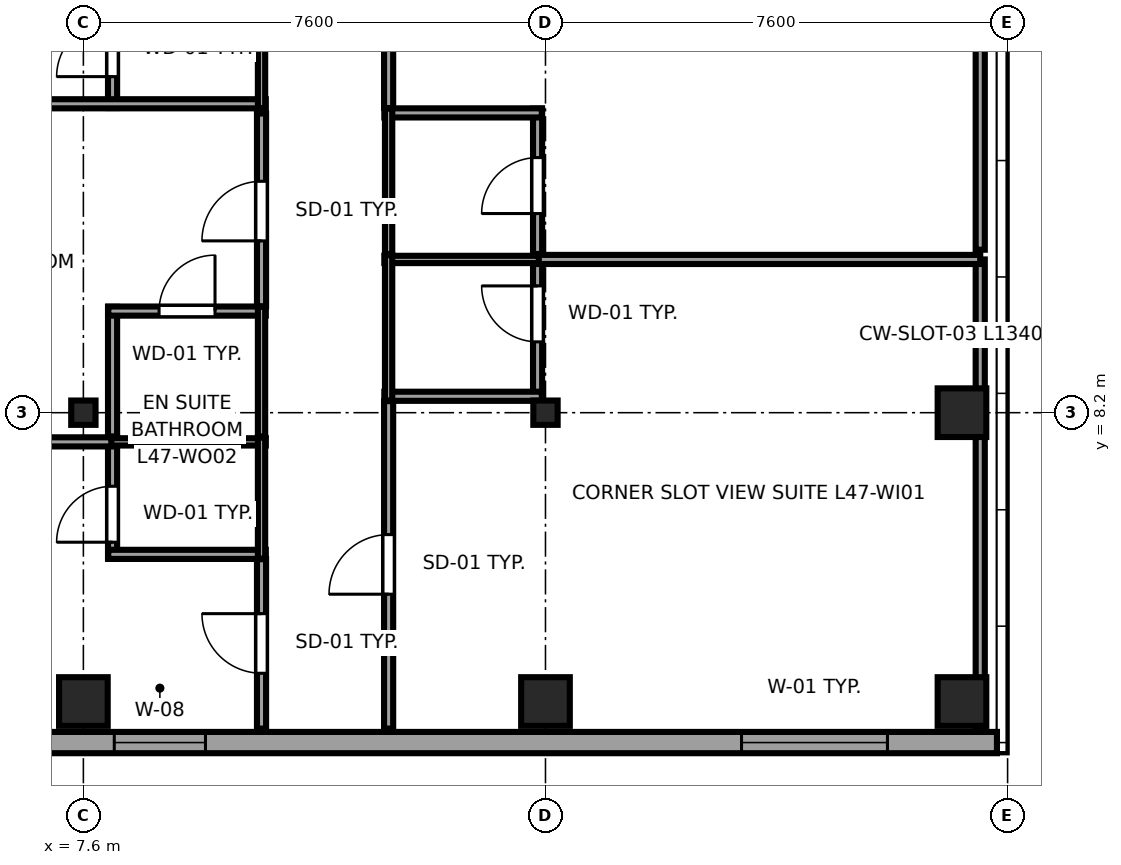
"""IFC4 building model, lengths in metres.
Left out: names, types, materials, properties, quantities, classifications, styles, units other than length and angle.
Written with IfcOpenShell. Run it as: python <this file> out.ifc"""

import sys

from ifc_helpers import new_model, si_unit, direction, frame, frame_2d, origin, origin_2d, place, context, subcontext, project, spatial, rectangle, i_section, extrude, source, transform, mapped, element, fill, save


model = new_model("IFC4")
c1 = context("Model", 3, precision=1e-05, world=origin(), true_north=direction((0.0, 1.0)))
c2 = subcontext(c1, "Body", "Model", "MODEL_VIEW")
j1 = project(units=[si_unit("LENGTHUNIT", "METRE"), si_unit("PLANEANGLEUNIT", "RADIAN")], contexts=[c1])
p1 = place(None, origin())
s1 = spatial("IfcSite", under=j1, at=p1, CompositionType="ELEMENT")
p2 = place(p1, origin())
s2 = spatial("IfcBuilding", under=s1, at=p2, CompositionType="ELEMENT")
p3 = place(p2, frame((0.0, 0.0, 179.0)))
s3 = spatial("IfcBuildingStorey", under=s2, at=p3, CompositionType="ELEMENT", Elevation=179.0)
m1 = source(origin(), c2, "Body", "SweptSolid", [
    extrude(rectangle(XDim=0.8, YDim=0.8, at=origin_2d()), origin(), (0.0, 0.0, 1.0), 3.55),
])
p4 = place(p3, frame((7.6, 3.45, 0.0), z_axis=(0.0, 0.0, 1.0), x_axis=(1.0, 0.0, 0.0)))
e1 = element("IfcColumn", 1, at=p4, inside=s3, PredefinedType="COLUMN", context=c2, shape_type="MappedRepresentation", body=[
    mapped(m1, transform((0.0, 0.0, 0.0), x_axis=(1.0, 0.0, 0.0), y_axis=(0.0, 1.0, 0.0), z_axis=(0.0, 0.0, 1.0), scale=1.0)),
])
m2 = source(origin(), c2, "Body", "SweptSolid", [
    extrude(i_section(OverallWidth=0.4, OverallDepth=0.4, WebThickness=0.02, FlangeThickness=0.035, at=origin_2d()), origin(), (0.0, 0.0, 1.0), 3.55),
])
p5 = place(p3, frame((7.6, 8.2, 0.0), z_axis=(0.0, 0.0, 1.0), x_axis=(1.0, 0.0, 0.0)))
e2 = element("IfcColumn", 2, at=p5, inside=s3, PredefinedType="COLUMN", context=c2, shape_type="MappedRepresentation", body=[
    mapped(m2, transform((0.0, 0.0, 0.0), x_axis=(1.0, 0.0, 0.0), y_axis=(0.0, 1.0, 0.0), z_axis=(0.0, 0.0, 1.0), scale=1.0)),
])
p6 = place(p3, frame((15.2, 3.45, 0.0), z_axis=(0.0, 0.0, 1.0), x_axis=(1.0, 0.0, 0.0)))
e3 = element("IfcColumn", 3, at=p6, inside=s3, PredefinedType="COLUMN", context=c2, shape_type="MappedRepresentation", body=[
    mapped(m1, transform((0.0, 0.0, 0.0), x_axis=(1.0, 0.0, 0.0), y_axis=(0.0, 1.0, 0.0), z_axis=(0.0, 0.0, 1.0), scale=1.0)),
])
p7 = place(p3, frame((15.2, 8.2, 0.0), z_axis=(0.0, 0.0, 1.0), x_axis=(1.0, 0.0, 0.0)))
e4 = element("IfcColumn", 4, at=p7, inside=s3, PredefinedType="COLUMN", context=c2, shape_type="MappedRepresentation", body=[
    mapped(m2, transform((0.0, 0.0, 0.0), x_axis=(1.0, 0.0, 0.0), y_axis=(0.0, 1.0, 0.0), z_axis=(0.0, 0.0, 1.0), scale=1.0)),
])
for number, where, z_axis, x_axis in (
    (5, (22.05, 3.45, 0.0), (0.0, 0.0, 1.0), (1.0, 0.0, 0.0)),
    (6, (22.05, 8.2, 0.0), (0.0, 0.0, 1.0), (1.0, 0.0, 0.0)),
):
    element("IfcColumn", number, at=place(p3, frame(where, z_axis=z_axis, x_axis=x_axis)), inside=s3, PredefinedType="COLUMN", context=c2, shape_type="MappedRepresentation", body=[
        mapped(m1, transform((0.0, 0.0, 0.0), x_axis=(1.0, 0.0, 0.0), y_axis=(0.0, 1.0, 0.0), z_axis=(0.0, 0.0, 1.0), scale=1.0)),
    ])
p8 = place(p3, frame((7.017, 2.775, 0.0), z_axis=(0.0, 0.0, 1.0), x_axis=(1.0, 0.0, 0.0)))
e7 = element("IfcWall", 7, at=p8, inside=s3, PredefinedType="SOLIDWALL", context=c2, shape_type="SweptSolid", body=[
    extrude(rectangle(XDim=15.608, YDim=0.35, at=frame_2d((7.804, 0.0))), origin(), (0.0, 0.0, 1.0), 3.25),
])
p9 = place(p8, frame((11.407, 0.0, 0.68)))
e8 = element("IfcOpeningElement", 8, at=p9, cuts=e7, PredefinedType="OPENING", context=c2, shape_type="SweptSolid", body=[
    extrude(rectangle(XDim=2.4, YDim=1.9, at=frame_2d((1.2, 0.95))), frame((0.0, 0.185, 0.0), z_axis=(0.0, -1.0, 0.0), x_axis=(1.0, 0.0, 0.0)), (0.0, 0.0, 1.0), 0.37),
])
p10 = place(p8, frame((1.091, 0.0, 0.62)))
e9 = element("IfcOpeningElement", 9, at=p10, cuts=e7, PredefinedType="OPENING", context=c2, shape_type="SweptSolid", body=[
    extrude(rectangle(XDim=1.5, YDim=1.55, at=frame_2d((0.75, 0.775))), frame((0.0, 0.185, 0.0), z_axis=(0.0, -1.0, 0.0), x_axis=(1.0, 0.0, 0.0)), (0.0, 0.0, 1.0), 0.37),
])
p11 = place(p3, frame((8.08, 5.8, 0.0), z_axis=(0.0, 0.0, 1.0), x_axis=(0.0, 1.0, 0.0)))
e10 = element("IfcWall", 10, at=p11, inside=s3, PredefinedType="PARTITIONING", context=c2, shape_type="SweptSolid", body=[
    extrude(rectangle(XDim=1.99, YDim=0.15, at=frame_2d((0.995, 0.0))), origin(), (0.0, 0.0, 1.0), 3.25),
])
p12 = place(p11, frame((0.27, 0.0, 0.0)))
e11 = element("IfcOpeningElement", 11, at=p12, cuts=e10, PredefinedType="OPENING", context=c2, shape_type="SweptSolid", body=[
    extrude(rectangle(XDim=0.92, YDim=2.01, at=frame_2d((0.46, 1.005))), frame((0.0, 0.085, 0.0), z_axis=(0.0, -1.0, 0.0), x_axis=(1.0, 0.0, 0.0)), (0.0, 0.0, 1.0), 0.17),
])
p13 = place(p3, frame((8.01, 5.87, 0.0), z_axis=(0.0, 0.0, 1.0), x_axis=(1.0, 0.0, 0.0)))
e12 = element("IfcWall", 12, at=p13, inside=s3, PredefinedType="PARTITIONING", context=c2, shape_type="SweptSolid", body=[
    extrude(rectangle(XDim=2.59, YDim=0.15, at=frame_2d((1.295, 0.0))), origin(), (0.0, 0.0, 1.0), 3.25),
])
p14 = place(p3, frame((8.01, 7.72, 0.0), z_axis=(0.0, 0.0, 1.0), x_axis=(1.0, 0.0, 0.0)))
e13 = element("IfcWall", 13, at=p14, inside=s3, PredefinedType="PLUMBINGWALL", context=c2, shape_type="SweptSolid", body=[
    extrude(rectangle(XDim=2.59, YDim=0.12, at=frame_2d((1.295, 0.0))), origin(), (0.0, 0.0, 1.0), 3.25),
])
p15 = place(p3, frame((10.53, 5.8, 0.0), z_axis=(0.0, 0.0, 1.0), x_axis=(0.0, 1.0, 0.0)))
e14 = element("IfcWall", 14, at=p15, inside=s3, PredefinedType="PLUMBINGWALL", context=c2, shape_type="SweptSolid", body=[
    extrude(rectangle(XDim=1.99, YDim=0.12, at=frame_2d((0.995, 0.0))), origin(), (0.0, 0.0, 1.0), 3.25),
])
p16 = place(p3, frame((8.08, 7.81, 0.0), z_axis=(0.0, 0.0, 1.0), x_axis=(0.0, 1.0, 0.0)))
e15 = element("IfcWall", 15, at=p16, inside=s3, PredefinedType="PARTITIONING", context=c2, shape_type="SweptSolid", body=[
    extrude(rectangle(XDim=2.131, YDim=0.15, at=frame_2d((1.065, 0.0))), origin(), (0.0, 0.0, 1.0), 3.25),
])
p17 = place(p3, frame((8.01, 9.871, 0.0), z_axis=(0.0, 0.0, 1.0), x_axis=(1.0, 0.0, 0.0)))
e16 = element("IfcWall", 16, at=p17, inside=s3, PredefinedType="PARTITIONING", context=c2, shape_type="SweptSolid", body=[
    extrude(rectangle(XDim=2.59, YDim=0.15, at=frame_2d((1.295, 0.0))), origin(), (0.0, 0.0, 1.0), 3.25),
])
p18 = place(p17, frame((0.835, 0.0, 0.0)))
e17 = element("IfcOpeningElement", 17, at=p18, cuts=e16, PredefinedType="OPENING", context=c2, shape_type="SweptSolid", body=[
    extrude(rectangle(XDim=0.92, YDim=2.01, at=frame_2d((0.46, 1.005))), frame((0.0, 0.085, 0.0), z_axis=(0.0, -1.0, 0.0), x_axis=(1.0, 0.0, 0.0)), (0.0, 0.0, 1.0), 0.17),
])
p19 = place(p3, frame((10.53, 7.81, 0.0), z_axis=(0.0, 0.0, 1.0), x_axis=(0.0, 1.0, 0.0)))
e18 = element("IfcWall", 18, at=p19, inside=s3, PredefinedType="PLUMBINGWALL", context=c2, shape_type="SweptSolid", body=[
    extrude(rectangle(XDim=2.131, YDim=0.12, at=frame_2d((1.065, 0.0))), origin(), (0.0, 0.0, 1.0), 3.25),
])
p20 = place(p3, frame((8.08, 13.21, 0.0), z_axis=(0.0, 0.0, 1.0), x_axis=(0.0, 1.0, 0.0)))
e19 = element("IfcWall", 19, at=p20, inside=s3, PredefinedType="PARTITIONING", context=c2, shape_type="SweptSolid", body=[
    extrude(rectangle(XDim=2.093, YDim=0.15, at=frame_2d((1.046, 0.0))), origin(), (0.0, 0.0, 1.0), 3.25),
])
p21 = place(p20, frame((0.517, 0.0, 0.0)))
e20 = element("IfcOpeningElement", 20, at=p21, cuts=e19, PredefinedType="OPENING", context=c2, shape_type="SweptSolid", body=[
    extrude(rectangle(XDim=0.92, YDim=2.01, at=frame_2d((0.46, 1.005))), frame((0.0, 0.085, 0.0), z_axis=(0.0, -1.0, 0.0), x_axis=(1.0, 0.0, 0.0)), (0.0, 0.0, 1.0), 0.17),
])
p22 = place(p3, frame((3.005, 13.28, 0.0), z_axis=(0.0, 0.0, 1.0), x_axis=(1.0, 0.0, 0.0)))
e21 = element("IfcWall", 21, at=p22, inside=s3, PredefinedType="PARTITIONING", context=c2, shape_type="SweptSolid", body=[
    extrude(rectangle(XDim=7.595, YDim=0.15, at=frame_2d((3.798, 0.0))), origin(), (0.0, 0.0, 1.0), 3.25),
])
p23 = place(p3, frame((10.53, 13.21, 0.0), z_axis=(0.0, 0.0, 1.0), x_axis=(0.0, 1.0, 0.0)))
e22 = element("IfcWall", 22, at=p23, inside=s3, PredefinedType="PLUMBINGWALL", context=c2, shape_type="SweptSolid", body=[
    extrude(rectangle(XDim=2.093, YDim=0.12, at=frame_2d((1.046, 0.0))), origin(), (0.0, 0.0, 1.0), 3.25),
])
p24 = place(p3, frame((15.07, 8.4, 0.0), z_axis=(0.0, 0.0, 1.0), x_axis=(0.0, 1.0, 0.0)))
e23 = element("IfcWall", 23, at=p24, inside=s3, PredefinedType="PARTITIONING", context=c2, shape_type="SweptSolid", body=[
    extrude(rectangle(XDim=2.39, YDim=0.15, at=frame_2d((1.195, 0.0))), origin(), (0.0, 0.0, 1.0), 2.707),
])
p25 = place(p24, frame((0.965, 0.0, 0.0)))
e24 = element("IfcOpeningElement", 24, at=p25, cuts=e23, PredefinedType="OPENING", context=c2, shape_type="SweptSolid", body=[
    extrude(rectangle(XDim=0.92, YDim=2.01, at=frame_2d((0.46, 1.005))), frame((0.0, 0.085, 0.0), z_axis=(0.0, -1.0, 0.0), x_axis=(1.0, 0.0, 0.0)), (0.0, 0.0, 1.0), 0.17),
])
p26 = place(p3, frame((12.55, 8.47, 0.0), z_axis=(0.0, 0.0, 1.0), x_axis=(1.0, 0.0, 0.0)))
e25 = element("IfcWall", 25, at=p26, inside=s3, PredefinedType="PARTITIONING", context=c2, shape_type="SweptSolid", body=[
    extrude(rectangle(XDim=2.59, YDim=0.15, at=frame_2d((1.295, 0.0))), origin(), (0.0, 0.0, 1.0), 3.25),
])
p27 = place(p3, frame((12.55, 10.72, 0.0), z_axis=(0.0, 0.0, 1.0), x_axis=(1.0, 0.0, 0.0)))
e26 = element("IfcWall", 26, at=p27, inside=s3, PredefinedType="PLUMBINGWALL", context=c2, shape_type="SweptSolid", body=[
    extrude(rectangle(XDim=2.59, YDim=0.12, at=frame_2d((1.295, 0.0))), origin(), (0.0, 0.0, 1.0), 3.25),
])
p28 = place(p3, frame((12.62, 8.4, 0.0), z_axis=(0.0, 0.0, 1.0), x_axis=(0.0, 1.0, 0.0)))
e27 = element("IfcWall", 27, at=p28, inside=s3, PredefinedType="PLUMBINGWALL", context=c2, shape_type="SweptSolid", body=[
    extrude(rectangle(XDim=2.39, YDim=0.12, at=frame_2d((1.195, 0.0))), origin(), (0.0, 0.0, 1.0), 3.25),
])
p29 = place(p3, frame((15.07, 10.81, 0.0), z_axis=(0.0, 0.0, 1.0), x_axis=(0.0, 1.0, 0.0)))
e28 = element("IfcWall", 28, at=p29, inside=s3, PredefinedType="PARTITIONING", context=c2, shape_type="SweptSolid", body=[
    extrude(rectangle(XDim=2.39, YDim=0.15, at=frame_2d((1.195, 0.0))), origin(), (0.0, 0.0, 1.0), 2.707),
])
p30 = place(p29, frame((0.665, 0.0, 0.0)))
e29 = element("IfcOpeningElement", 29, at=p30, cuts=e28, PredefinedType="OPENING", context=c2, shape_type="SweptSolid", body=[
    extrude(rectangle(XDim=0.92, YDim=2.01, at=frame_2d((0.46, 1.005))), frame((0.0, 0.085, 0.0), z_axis=(0.0, -1.0, 0.0), x_axis=(1.0, 0.0, 0.0)), (0.0, 0.0, 1.0), 0.17),
])
p31 = place(p3, frame((12.55, 13.13, 0.0), z_axis=(0.0, 0.0, 1.0), x_axis=(1.0, 0.0, 0.0)))
e30 = element("IfcWall", 30, at=p31, inside=s3, PredefinedType="PARTITIONING", context=c2, shape_type="SweptSolid", body=[
    extrude(rectangle(XDim=2.59, YDim=0.15, at=frame_2d((1.295, 0.0))), origin(), (0.0, 0.0, 1.0), 3.25),
])
p32 = place(p3, frame((12.62, 10.81, 0.0), z_axis=(0.0, 0.0, 1.0), x_axis=(0.0, 1.0, 0.0)))
e31 = element("IfcWall", 31, at=p32, inside=s3, PredefinedType="PLUMBINGWALL", context=c2, shape_type="SweptSolid", body=[
    extrude(rectangle(XDim=2.39, YDim=0.12, at=frame_2d((1.195, 0.0))), origin(), (0.0, 0.0, 1.0), 3.25),
])
p33 = place(p3, frame((10.53, 3.005, 0.0), z_axis=(0.0, 0.0, 1.0), x_axis=(0.0, 1.0, 0.0)))
e32 = element("IfcWall", 32, at=p33, inside=s3, PredefinedType="PARTITIONING", context=c2, shape_type="SweptSolid", body=[
    extrude(rectangle(XDim=2.785, YDim=0.15, at=frame_2d((1.393, 0.0))), origin(), (0.0, 0.0, 1.0), 3.25),
])
p34 = place(p33, frame((0.91, 0.0, 0.0)))
e33 = element("IfcOpeningElement", 33, at=p34, cuts=e32, PredefinedType="OPENING", context=c2, shape_type="SweptSolid", body=[
    extrude(rectangle(XDim=0.98, YDim=2.12, at=frame_2d((0.49, 1.06))), frame((0.0, 0.085, 0.0), z_axis=(0.0, -1.0, 0.0), x_axis=(1.0, 0.0, 0.0)), (0.0, 0.0, 1.0), 0.17),
])
p35 = place(p3, frame((3.005, 7.72, 0.0), z_axis=(0.0, 0.0, 1.0), x_axis=(1.0, 0.0, 0.0)))
e34 = element("IfcWall", 34, at=p35, inside=s3, PredefinedType="PARTITIONING", context=c2, shape_type="SweptSolid", body=[
    extrude(rectangle(XDim=5.055, YDim=0.15, at=frame_2d((2.528, 0.0))), origin(), (0.0, 0.0, 1.0), 3.25),
])
p36 = place(p3, frame((10.53, 9.951, 0.0), z_axis=(0.0, 0.0, 1.0), x_axis=(0.0, 1.0, 0.0)))
e35 = element("IfcWall", 35, at=p36, inside=s3, PredefinedType="PARTITIONING", context=c2, shape_type="SweptSolid", body=[
    extrude(rectangle(XDim=3.169, YDim=0.15, at=frame_2d((1.584, 0.0))), origin(), (0.0, 0.0, 1.0), 3.25),
])
p37 = place(p36, frame((1.074, 0.0, 0.0)))
e36 = element("IfcOpeningElement", 36, at=p37, cuts=e35, PredefinedType="OPENING", context=c2, shape_type="SweptSolid", body=[
    extrude(rectangle(XDim=0.98, YDim=2.12, at=frame_2d((0.49, 1.06))), frame((0.0, 0.085, 0.0), z_axis=(0.0, -1.0, 0.0), x_axis=(1.0, 0.0, 0.0)), (0.0, 0.0, 1.0), 0.17),
])
p38 = place(p3, frame((12.62, 3.005, 0.0), z_axis=(0.0, 0.0, 1.0), x_axis=(0.0, 1.0, 0.0)))
e37 = element("IfcWall", 37, at=p38, inside=s3, PredefinedType="PARTITIONING", context=c2, shape_type="SweptSolid", body=[
    extrude(rectangle(XDim=5.385, YDim=0.15, at=frame_2d((2.692, 0.0))), origin(), (0.0, 0.0, 1.0), 3.25),
])
p39 = place(p38, frame((2.21, 0.0, 0.0)))
e38 = element("IfcOpeningElement", 38, at=p39, cuts=e37, PredefinedType="OPENING", context=c2, shape_type="SweptSolid", body=[
    extrude(rectangle(XDim=0.98, YDim=2.12, at=frame_2d((0.49, 1.06))), frame((0.0, 0.085, 0.0), z_axis=(0.0, -1.0, 0.0), x_axis=(1.0, 0.0, 0.0)), (0.0, 0.0, 1.0), 0.17),
])
p40 = place(p3, frame((22.35, 3.005, 0.0), z_axis=(0.0, 0.0, 1.0), x_axis=(0.0, 1.0, 0.0)))
e39 = element("IfcWall", 39, at=p40, inside=s3, PredefinedType="PARTITIONING", context=c2, shape_type="SweptSolid", body=[
    extrude(rectangle(XDim=7.715, YDim=0.15, at=frame_2d((3.857, 0.0))), origin(), (0.0, 0.0, 1.0), 3.25),
])
p41 = place(p3, frame((15.09, 10.72, 0.0), z_axis=(0.0, 0.0, 1.0), x_axis=(1.0, 0.0, 0.0)))
e40 = element("IfcWall", 40, at=p41, inside=s3, PredefinedType="PARTITIONING", context=c2, shape_type="SweptSolid", body=[
    extrude(rectangle(XDim=7.26, YDim=0.15, at=frame_2d((3.63, 0.0))), origin(), (0.0, 0.0, 1.0), 3.25),
])
p42 = place(p3, frame((12.62, 13.21, 0.0), z_axis=(0.0, 0.0, 1.0), x_axis=(0.0, 1.0, 0.0)))
e41 = element("IfcWall", 41, at=p42, inside=s3, PredefinedType="PARTITIONING", context=c2, shape_type="SweptSolid", body=[
    extrude(rectangle(XDim=5.21, YDim=0.15, at=frame_2d((2.605, 0.0))), origin(), (0.0, 0.0, 1.0), 3.25),
])
p43 = place(p42, frame((2.095, 0.0, 0.0)))
e42 = element("IfcOpeningElement", 42, at=p43, cuts=e41, PredefinedType="OPENING", context=c2, shape_type="SweptSolid", body=[
    extrude(rectangle(XDim=0.98, YDim=2.12, at=frame_2d((0.49, 1.06))), frame((0.0, 0.085, 0.0), z_axis=(0.0, -1.0, 0.0), x_axis=(1.0, 0.0, 0.0)), (0.0, 0.0, 1.0), 0.17),
])
p44 = place(p3, frame((22.35, 10.88, 0.0), z_axis=(0.0, 0.0, 1.0), x_axis=(0.0, 1.0, 0.0)))
e43 = element("IfcWall", 43, at=p44, inside=s3, PredefinedType="PARTITIONING", context=c2, shape_type="SweptSolid", body=[
    extrude(rectangle(XDim=7.54, YDim=0.15, at=frame_2d((3.77, 0.0))), origin(), (0.0, 0.0, 1.0), 3.25),
])
m3 = source(origin(), c2, "Body", "SweptSolid", [
    extrude(rectangle(XDim=2.4, YDim=1.9, at=frame_2d((1.2, 0.95))), frame((0.0, 0.09, 0.0), z_axis=(0.0, -1.0, 0.0), x_axis=(1.0, 0.0, 0.0)), (0.0, 0.0, 1.0), 0.06),
])
p45 = place(p9, origin())
e44 = element("IfcWindow", 44, at=p45, inside=s3, PartitioningType="TRIPLE_PANEL_HORIZONTAL", PredefinedType="WINDOW", context=c2, shape_type="MappedRepresentation", body=[
    mapped(m3, transform((0.0, 0.0, 0.0), x_axis=(1.0, 0.0, 0.0), y_axis=(0.0, 1.0, 0.0), z_axis=(0.0, 0.0, 1.0), scale=1.0)),
])
fill(e8, e44)
m4 = source(origin(), c2, "Body", "SweptSolid", [
    extrude(rectangle(XDim=1.5, YDim=1.55, at=frame_2d((0.75, 0.775))), frame((0.0, 0.09, 0.0), z_axis=(0.0, -1.0, 0.0), x_axis=(1.0, 0.0, 0.0)), (0.0, 0.0, 1.0), 0.06),
])
p46 = place(p10, origin())
e45 = element("IfcWindow", 45, at=p46, inside=s3, PartitioningType="SINGLE_PANEL", PredefinedType="WINDOW", context=c2, shape_type="MappedRepresentation", body=[
    mapped(m4, transform((0.0, 0.0, 0.0), x_axis=(1.0, 0.0, 0.0), y_axis=(0.0, 1.0, 0.0), z_axis=(0.0, 0.0, 1.0), scale=1.0)),
])
fill(e9, e45)
m5 = source(origin(), c2, "Body", "SweptSolid", [
    extrude(rectangle(XDim=0.92, YDim=2.01, at=frame_2d((0.46, 1.005))), frame((0.0, 0.025, 0.0), z_axis=(0.0, -1.0, 0.0), x_axis=(1.0, 0.0, 0.0)), (0.0, 0.0, 1.0), 0.05),
])
p47 = place(p12, origin())
e46 = element("IfcDoor", 46, at=p47, inside=s3, OperationType="SINGLE_SWING_LEFT", PredefinedType="DOOR", context=c2, shape_type="MappedRepresentation", body=[
    mapped(m5, transform((0.0, 0.0, 0.0), x_axis=(1.0, 0.0, 0.0), y_axis=(0.0, 1.0, 0.0), z_axis=(0.0, 0.0, 1.0), scale=1.0)),
])
fill(e11, e46)
p48 = place(p18, origin())
e47 = element("IfcDoor", 47, at=p48, inside=s3, OperationType="SINGLE_SWING_RIGHT", PredefinedType="DOOR", context=c2, shape_type="MappedRepresentation", body=[
    mapped(m5, transform((0.0, 0.0, 0.0), x_axis=(1.0, 0.0, 0.0), y_axis=(0.0, 1.0, 0.0), z_axis=(0.0, 0.0, 1.0), scale=1.0)),
])
fill(e17, e47)
p49 = place(p21, origin())
e48 = element("IfcDoor", 48, at=p49, inside=s3, OperationType="SINGLE_SWING_LEFT", PredefinedType="DOOR", context=c2, shape_type="MappedRepresentation", body=[
    mapped(m5, transform((0.0, 0.0, 0.0), x_axis=(1.0, 0.0, 0.0), y_axis=(0.0, 1.0, 0.0), z_axis=(0.0, 0.0, 1.0), scale=1.0)),
])
fill(e20, e48)
p50 = place(p25, origin())
e49 = element("IfcDoor", 49, at=p50, inside=s3, OperationType="SINGLE_SWING_RIGHT", PredefinedType="DOOR", context=c2, shape_type="MappedRepresentation", body=[
    mapped(m5, transform((0.0, 0.0, 0.0), x_axis=(1.0, 0.0, 0.0), y_axis=(0.0, 1.0, 0.0), z_axis=(0.0, 0.0, 1.0), scale=1.0)),
])
fill(e24, e49)
p51 = place(p30, origin())
e50 = element("IfcDoor", 50, at=p51, inside=s3, OperationType="SINGLE_SWING_LEFT", PredefinedType="DOOR", context=c2, shape_type="MappedRepresentation", body=[
    mapped(m5, transform((0.0, 0.0, 0.0), x_axis=(1.0, 0.0, 0.0), y_axis=(0.0, 1.0, 0.0), z_axis=(0.0, 0.0, 1.0), scale=1.0)),
])
fill(e29, e50)
m6 = source(origin(), c2, "Body", "SweptSolid", [
    extrude(rectangle(XDim=0.98, YDim=2.12, at=frame_2d((0.49, 1.06))), frame((0.0, 0.025, 0.0), z_axis=(0.0, -1.0, 0.0), x_axis=(1.0, 0.0, 0.0)), (0.0, 0.0, 1.0), 0.05),
])
p52 = place(p34, origin())
e51 = element("IfcDoor", 51, at=p52, inside=s3, OperationType="SINGLE_SWING_RIGHT", PredefinedType="DOOR", context=c2, shape_type="MappedRepresentation", body=[
    mapped(m6, transform((0.0, 0.0, 0.0), x_axis=(1.0, 0.0, 0.0), y_axis=(0.0, 1.0, 0.0), z_axis=(0.0, 0.0, 1.0), scale=1.0)),
])
fill(e33, e51)
p53 = place(p37, origin())
e52 = element("IfcDoor", 52, at=p53, inside=s3, OperationType="SINGLE_SWING_LEFT", PredefinedType="DOOR", context=c2, shape_type="MappedRepresentation", body=[
    mapped(m6, transform((0.0, 0.0, 0.0), x_axis=(1.0, 0.0, 0.0), y_axis=(0.0, 1.0, 0.0), z_axis=(0.0, 0.0, 1.0), scale=1.0)),
])
fill(e36, e52)
p54 = place(p39, origin())
e53 = element("IfcDoor", 53, at=p54, inside=s3, OperationType="SINGLE_SWING_LEFT", PredefinedType="DOOR", context=c2, shape_type="MappedRepresentation", body=[
    mapped(m6, transform((0.0, 0.0, 0.0), x_axis=(1.0, 0.0, 0.0), y_axis=(0.0, 1.0, 0.0), z_axis=(0.0, 0.0, 1.0), scale=1.0)),
])
fill(e38, e53)
save(model, sys.argv[1])
